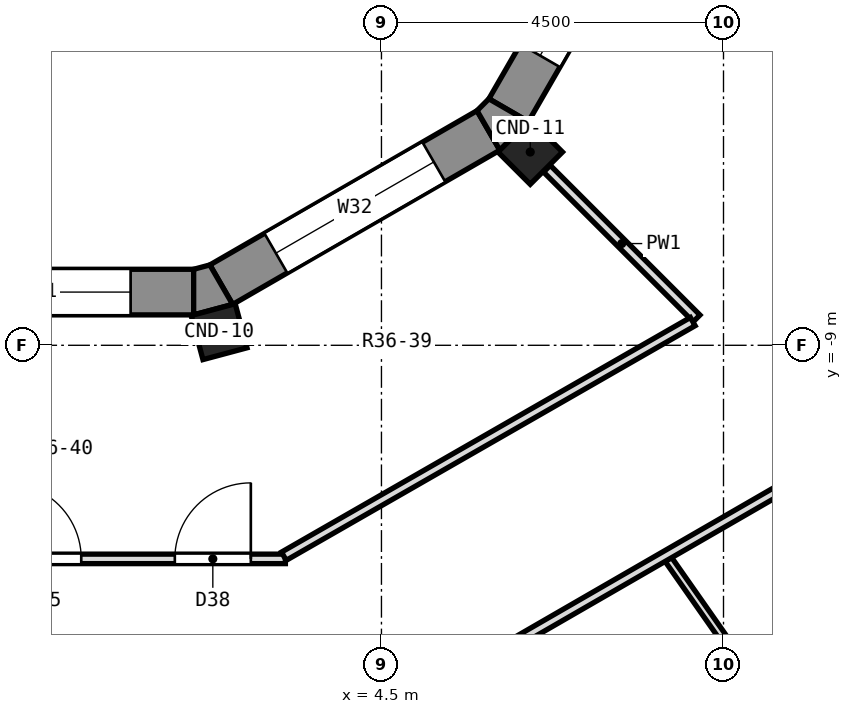
"""IFC4 building model, lengths in metres.
Left out: names, types, materials, properties, quantities, classifications, styles, units other than length and angle.
Written with IfcOpenShell. Run it as: python <this file> out.ifc"""

import sys

from ifc_helpers import new_model, si_unit, direction, frame, frame_2d, origin, origin_2d, place, context, subcontext, project, spatial, polyline, rectangle, outline, extrude, element, fill, save


model = new_model("IFC4")
c1 = context("Model", 3, precision=1e-05, world=origin(), true_north=direction((0.0, 1.0)))
c2 = subcontext(c1, "Body", "Model", "MODEL_VIEW")
j1 = project(units=[si_unit("LENGTHUNIT", "METRE"), si_unit("PLANEANGLEUNIT", "RADIAN")], contexts=[c1])
p1 = place(None, origin())
s1 = spatial("IfcSite", under=j1, at=p1, CompositionType="ELEMENT")
p2 = place(p1, origin())
s2 = spatial("IfcBuilding", under=s1, at=p2, CompositionType="ELEMENT")
p3 = place(p2, frame((0.0, 0.0, 259.4)))
s3 = spatial("IfcBuildingStorey", under=s2, at=p3, CompositionType="ELEMENT", Elevation=259.4)
for number, where, z_axis, x_axis in (
    (1, (2.364, -8.821, 0.0), (0.0, 0.0, 1.0), (0.259, -0.966, 0.0)),
    (2, (6.458, -6.458, 0.0), (0.0, 0.0, 1.0), (0.707, -0.707, 0.0)),
):
    element("IfcColumn", number, at=place(p3, frame(where, z_axis=z_axis, x_axis=x_axis)), inside=s3, PredefinedType="COLUMN", context=c2, shape_type="SweptSolid", body=[
        extrude(rectangle(XDim=0.6, YDim=0.6, at=origin_2d()), origin(), (0.0, 0.0, 1.0), 3.3),
    ])
p4 = place(p3, frame((-2.029, -8.3, 0.0), z_axis=(0.0, 0.0, 1.0), x_axis=(1.0, 0.0, 0.0)))
e3 = element("IfcWall", 3, at=p4, inside=s3, PredefinedType="SOLIDWALL", context=c2, shape_type="SweptSolid", body=[
    extrude(rectangle(XDim=4.059, YDim=0.6, at=frame_2d((2.029, 0.0))), origin(), (0.0, 0.0, 1.0), 2.9),
])
p5 = place(p4, frame((0.829, 0.0, 0.9)))
e4 = element("IfcOpeningElement", 4, at=p5, cuts=e3, PredefinedType="OPENING", context=c2, shape_type="SweptSolid", body=[
    extrude(rectangle(XDim=2.4, YDim=1.8, at=frame_2d((1.2, 0.9))), frame((0.0, 0.312, 0.0), z_axis=(0.0, -1.0, 0.0), x_axis=(1.0, 0.0, 0.0)), (0.0, 0.0, 1.0), 0.624),
])
p6 = place(p3, frame((2.393, -8.203, 0.0), z_axis=(0.0, 0.0, 1.0), x_axis=(0.866028316509, 0.499994954979, 0.0)))
e5 = element("IfcWall", 5, at=p6, inside=s3, PredefinedType="SOLIDWALL", context=c2, shape_type="SweptSolid", body=[
    extrude(rectangle(XDim=4.059, YDim=0.6, at=frame_2d((2.029, 0.0))), origin(), (0.0, 0.0, 1.0), 2.9),
])
p7 = place(p6, frame((0.829, 0.0, 0.9)))
e6 = element("IfcOpeningElement", 6, at=p7, cuts=e5, PredefinedType="OPENING", context=c2, shape_type="SweptSolid", body=[
    extrude(rectangle(XDim=2.4, YDim=1.8, at=frame_2d((1.2, 0.9))), frame((0.0, 0.312, 0.0), z_axis=(0.0, -1.0, 0.0), x_axis=(1.0, 0.0, 0.0)), (0.0, 0.0, 1.0), 0.624),
])
p8 = place(p3, frame((6.173, -5.907, 0.0), z_axis=(0.0, 0.0, 1.0), x_axis=(0.499994954979, 0.866028316509, 0.0)))
e7 = element("IfcWall", 7, at=p8, inside=s3, PredefinedType="SOLIDWALL", context=c2, shape_type="SweptSolid", body=[
    extrude(rectangle(XDim=4.059, YDim=0.6, at=frame_2d((2.029, 0.0))), origin(), (0.0, 0.0, 1.0), 2.9),
])
p9 = place(p8, frame((0.829, 0.0, 0.9)))
e8 = element("IfcOpeningElement", 8, at=p9, cuts=e7, PredefinedType="OPENING", context=c2, shape_type="SweptSolid", body=[
    extrude(rectangle(XDim=2.4, YDim=1.8, at=frame_2d((1.2, 0.9))), frame((0.0, 0.312, 0.0), z_axis=(0.0, -1.0, 0.0), x_axis=(1.0, 0.0, 0.0)), (0.0, 0.0, 1.0), 0.624),
])
p10 = place(p3, origin())
e9 = element("IfcWall", 9, at=p10, inside=s3, PredefinedType="SOLIDWALL", context=c2, shape_type="SweptSolid", body=[
    extrude(outline(polyline([(2.542, -8.462), (2.242, -7.943), (2.029, -8.0), (2.029, -8.6), (2.542, -8.462)])), origin(), (0.0, 0.0, 1.0), 2.9),
])
p11 = place(p3, origin())
e10 = element("IfcWall", 10, at=p11, inside=s3, PredefinedType="SOLIDWALL", context=c2, shape_type="SweptSolid", body=[
    extrude(outline(polyline([(6.433, -6.058), (5.914, -5.758), (5.758, -5.914), (6.058, -6.433), (6.433, -6.058)])), origin(), (0.0, 0.0, 1.0), 2.9),
])
p12 = place(p3, frame((8.275, -11.818, 0.0), z_axis=(0.0, 0.0, 1.0), x_axis=(0.573597629831, -0.819137204046, 0.0)))
e11 = element("IfcWall", 11, at=p12, inside=s3, PredefinedType="PARTITIONING", context=c2, shape_type="SweptSolid", body=[
    extrude(rectangle(XDim=7.388, YDim=0.1, at=frame_2d((3.694, 0.0))), origin(), (0.0, 0.0, 1.0), 2.9),
])
p13 = place(p12, frame((3.504, 0.0, 0.0)))
e12 = element("IfcOpeningElement", 12, at=p13, cuts=e11, PredefinedType="OPENING", context=c2, shape_type="SweptSolid", body=[
    extrude(rectangle(XDim=0.9, YDim=2.1, at=frame_2d((0.45, 1.05))), frame((0.0, 0.062, 0.0), z_axis=(0.0, -1.0, 0.0), x_axis=(1.0, 0.0, 0.0)), (0.0, 0.0, 1.0), 0.124),
])
p14 = place(p3, frame((6.677, -6.677, 0.0), z_axis=(0.0, 0.0, 1.0), x_axis=(0.707106781187, -0.707106781187, 0.0)))
e13 = element("IfcWall", 13, at=p14, inside=s3, PredefinedType="PARTITIONING", context=c2, shape_type="SweptSolid", body=[
    extrude(rectangle(XDim=2.785, YDim=0.125, at=frame_2d((1.393, 0.0))), origin(), (0.0, 0.0, 1.0), 2.9),
])
p15 = place(p3, frame((-3.102, -11.81, 0.0), z_axis=(0.0, 0.0, 1.0), x_axis=(1.0, 0.0, 0.0)))
e14 = element("IfcWall", 14, at=p15, inside=s3, PredefinedType="PARTITIONING", context=c2, shape_type="SweptSolid", body=[
    extrude(rectangle(XDim=6.338, YDim=0.125, at=frame_2d((3.169, 0.0))), origin(), (0.0, 0.0, 1.0), 2.9),
])
p16 = place(p15, frame((2.652, 0.0, 0.0)))
e15 = element("IfcOpeningElement", 15, at=p16, cuts=e14, PredefinedType="OPENING", context=c2, shape_type="SweptSolid", body=[
    extrude(rectangle(XDim=1.0, YDim=2.1, at=frame_2d((0.5, 1.05))), frame((0.0, 0.074, 0.0), z_axis=(0.0, -1.0, 0.0), x_axis=(1.0, 0.0, 0.0)), (0.0, 0.0, 1.0), 0.149),
])
p17 = place(p15, frame((4.883, 0.0, 0.0)))
e16 = element("IfcOpeningElement", 16, at=p17, cuts=e14, PredefinedType="OPENING", context=c2, shape_type="SweptSolid", body=[
    extrude(rectangle(XDim=1.0, YDim=2.1, at=frame_2d((0.5, 1.05))), frame((0.0, 0.074, 0.0), z_axis=(0.0, -1.0, 0.0), x_axis=(1.0, 0.0, 0.0)), (0.0, 0.0, 1.0), 0.149),
])
p18 = place(p3, frame((3.216, -11.775, 0.0), z_axis=(0.0, 0.0, 1.0), x_axis=(0.86736732566, 0.497668486422, 0.0)))
e17 = element("IfcWall", 17, at=p18, inside=s3, PredefinedType="PARTITIONING", context=c2, shape_type="SweptSolid", body=[
    extrude(rectangle(XDim=6.202, YDim=0.125, at=frame_2d((3.101, 0.0))), origin(), (0.0, 0.0, 1.0), 2.9),
])
p19 = place(p3, frame((3.888, -14.279, 0.0), z_axis=(0.0, 0.0, 1.0), x_axis=(0.866068111199, 0.499926021291, 0.0)))
e18 = element("IfcWall", 18, at=p19, inside=s3, PredefinedType="PARTITIONING", context=c2, shape_type="SweptSolid", body=[
    extrude(rectangle(XDim=7.544, YDim=0.125, at=frame_2d((3.772, 0.0))), origin(), (0.0, 0.0, 1.0), 2.9),
])
p20 = place(p19, frame((0.727, 0.0, 0.0)))
e19 = element("IfcOpeningElement", 19, at=p20, cuts=e18, PredefinedType="OPENING", context=c2, shape_type="SweptSolid", body=[
    extrude(rectangle(XDim=1.0, YDim=2.1, at=frame_2d((0.5, 1.05))), frame((0.0, 0.074, 0.0), z_axis=(0.0, -1.0, 0.0), x_axis=(1.0, 0.0, 0.0)), (0.0, 0.0, 1.0), 0.149),
])
p21 = place(p5, origin())
e20 = element("IfcWindow", 20, at=p21, inside=s3, PartitioningType="SINGLE_PANEL", PredefinedType="WINDOW", context=c2, shape_type="SweptSolid", body=[
    extrude(rectangle(XDim=2.4, YDim=1.8, at=frame_2d((1.2, 0.9))), frame((0.0, -0.12, 0.0), z_axis=(0.0, -1.0, 0.0), x_axis=(1.0, 0.0, 0.0)), (0.0, 0.0, 1.0), 0.06),
])
fill(e4, e20)
p22 = place(p7, origin())
e21 = element("IfcWindow", 21, at=p22, inside=s3, PartitioningType="SINGLE_PANEL", PredefinedType="WINDOW", context=c2, shape_type="SweptSolid", body=[
    extrude(rectangle(XDim=2.4, YDim=1.8, at=frame_2d((1.2, 0.9))), frame((0.0, -0.12, 0.0), z_axis=(0.0, -1.0, 0.0), x_axis=(1.0, 0.0, 0.0)), (0.0, 0.0, 1.0), 0.06),
])
fill(e6, e21)
p23 = place(p9, origin())
e22 = element("IfcWindow", 22, at=p23, inside=s3, PartitioningType="SINGLE_PANEL", PredefinedType="WINDOW", context=c2, shape_type="SweptSolid", body=[
    extrude(rectangle(XDim=2.4, YDim=1.8, at=frame_2d((1.2, 0.9))), frame((0.0, -0.12, 0.0), z_axis=(0.0, -1.0, 0.0), x_axis=(1.0, 0.0, 0.0)), (0.0, 0.0, 1.0), 0.06),
])
fill(e8, e22)
p24 = place(p16, origin())
e23 = element("IfcDoor", 23, at=p24, inside=s3, OperationType="SINGLE_SWING_LEFT", PredefinedType="DOOR", context=c2, shape_type="SweptSolid", body=[
    extrude(rectangle(XDim=1.0, YDim=2.1, at=frame_2d((0.5, 1.05))), frame((0.0, 0.025, 0.0), z_axis=(0.0, -1.0, 0.0), x_axis=(1.0, 0.0, 0.0)), (0.0, 0.0, 1.0), 0.05),
])
fill(e15, e23)
p25 = place(p17, origin())
e24 = element("IfcDoor", 24, at=p25, inside=s3, OperationType="SINGLE_SWING_RIGHT", PredefinedType="DOOR", context=c2, shape_type="SweptSolid", body=[
    extrude(rectangle(XDim=1.0, YDim=2.1, at=frame_2d((0.5, 1.05))), frame((0.0, 0.025, 0.0), z_axis=(0.0, -1.0, 0.0), x_axis=(1.0, 0.0, 0.0)), (0.0, 0.0, 1.0), 0.05),
])
fill(e16, e24)
save(model, sys.argv[1])
